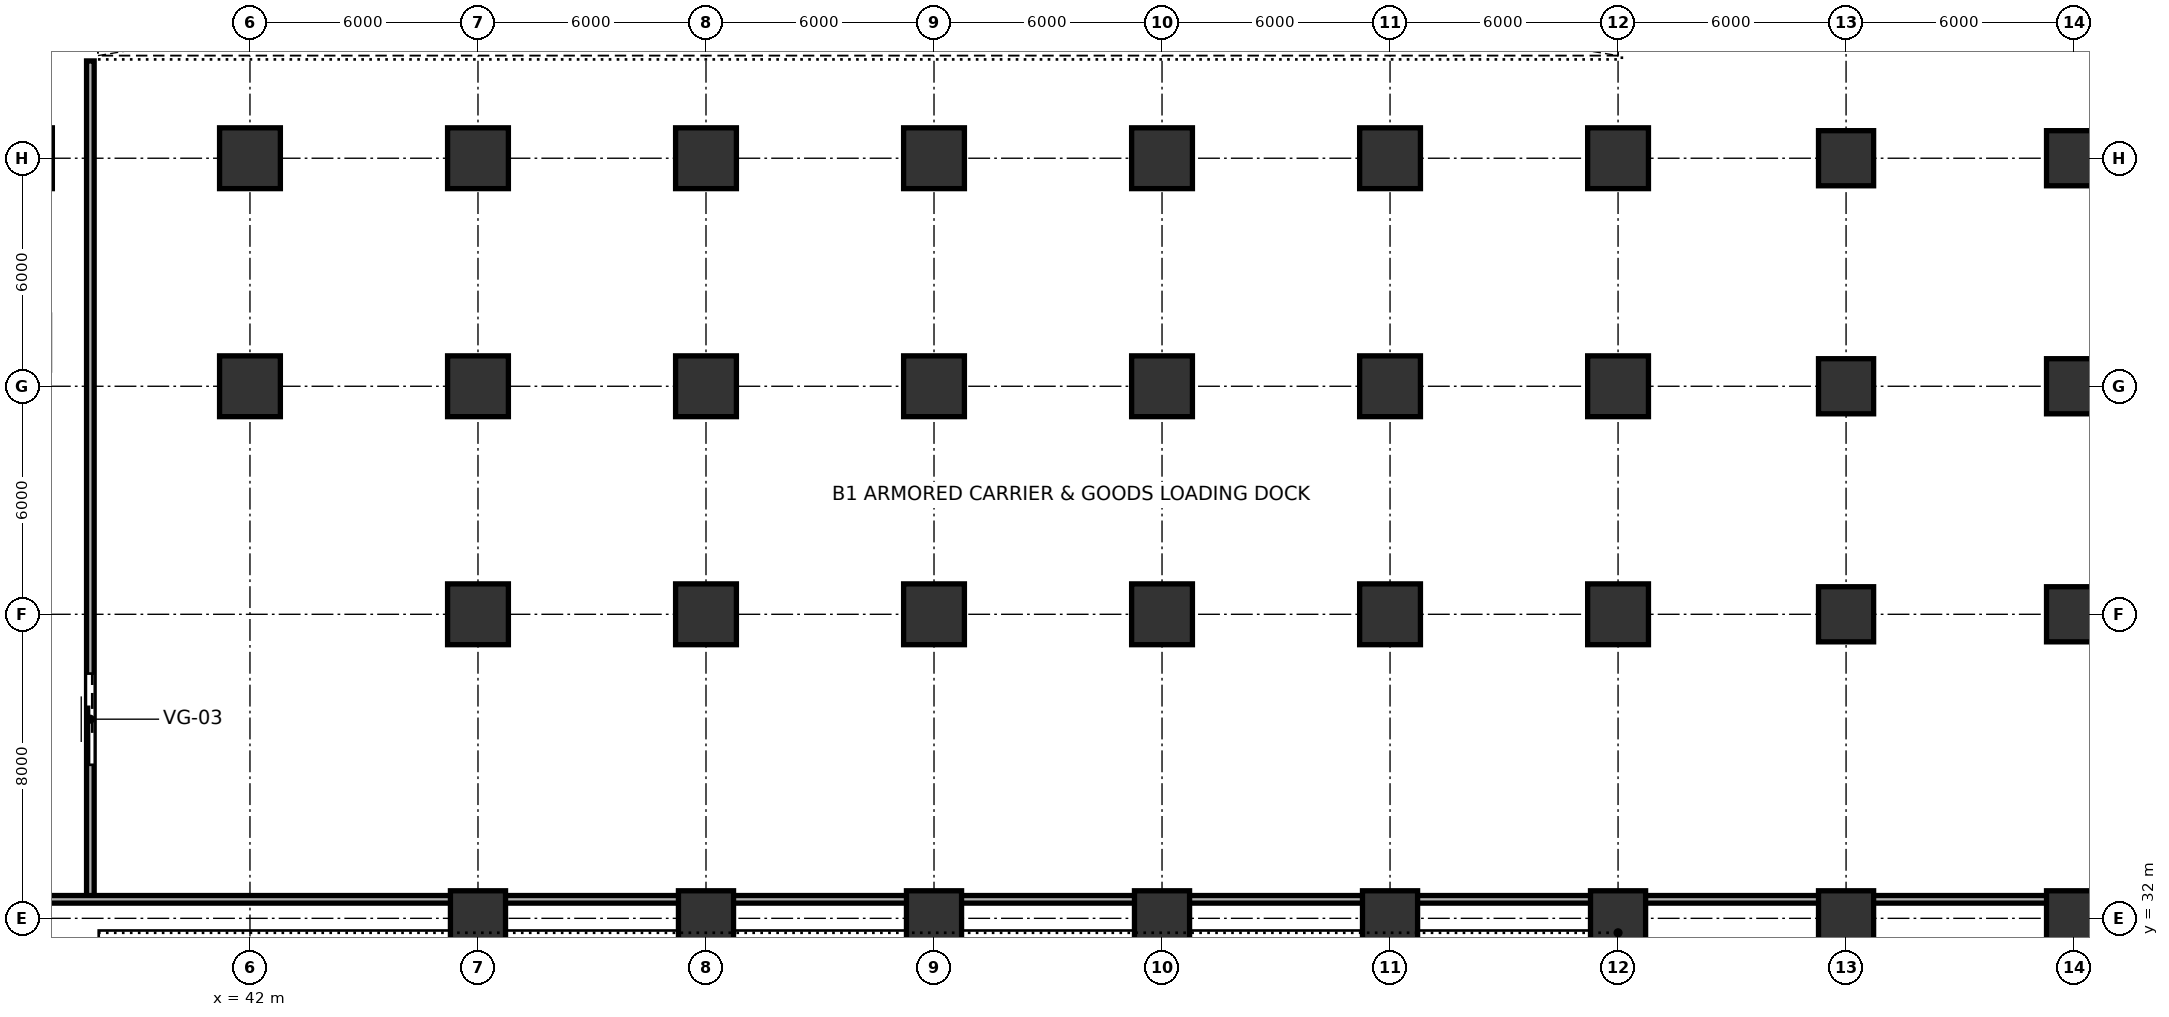
"""IFC4 building model, lengths in metres.
Left out: names, types, materials, properties, quantities, classifications, styles, units other than length and angle.
Written with IfcOpenShell. Run it as: python <this file> out.ifc"""

import sys

from ifc_helpers import new_model, si_unit, direction, frame, frame_2d, origin, origin_2d, place, context, subcontext, project, spatial, rectangle, extrude, source, transform, mapped, element, fill, save


model = new_model("IFC4")
c1 = context("Model", 3, precision=1e-05, world=origin(), true_north=direction((0.0, 1.0)))
c2 = subcontext(c1, "Body", "Model", "MODEL_VIEW")
j1 = project(units=[si_unit("LENGTHUNIT", "METRE"), si_unit("PLANEANGLEUNIT", "RADIAN")], contexts=[c1])
p1 = place(None, origin())
s1 = spatial("IfcSite", under=j1, at=p1, CompositionType="ELEMENT")
p2 = place(p1, origin())
s2 = spatial("IfcBuilding", under=s1, at=p2, CompositionType="ELEMENT")
p3 = place(p2, frame((0.0, 0.0, -4.8)))
s3 = spatial("IfcBuildingStorey", under=s2, at=p3, CompositionType="ELEMENT", Elevation=-4.8)
m1 = source(origin(), c2, "Body", "SweptSolid", [
    extrude(rectangle(XDim=1.6, YDim=1.6, at=origin_2d()), origin(), (0.0, 0.0, 1.0), 4.799),
])
for number, where, z_axis, x_axis in (
    (1, (42.0, 46.0, 0.001), (0.0, 0.0, 1.0), (1.0, 0.0, 0.0)),
    (2, (42.0, 52.0, 0.001), (0.0, 0.0, 1.0), (1.0, 0.0, 0.0)),
):
    element("IfcColumn", number, at=place(p3, frame(where, z_axis=z_axis, x_axis=x_axis)), inside=s3, PredefinedType="COLUMN", context=c2, shape_type="MappedRepresentation", body=[
        mapped(m1, transform((0.0, 0.0, 0.0), scale=1.0)),
    ])
m2 = source(origin(), c2, "Body", "SweptSolid", [
    extrude(rectangle(XDim=1.45, YDim=1.45, at=origin_2d()), origin(), (0.0, 0.0, 1.0), 4.799),
])
p4 = place(p3, frame((48.0, 32.0, 0.001), z_axis=(0.0, 0.0, 1.0), x_axis=(1.0, 0.0, 0.0)))
e3 = element("IfcColumn", 3, at=p4, inside=s3, PredefinedType="COLUMN", context=c2, shape_type="MappedRepresentation", body=[
    mapped(m2, transform((0.0, 0.0, 0.0), scale=1.0)),
])
for number, where, z_axis, x_axis in (
    (4, (48.0, 40.0, 0.001), (0.0, 0.0, 1.0), (1.0, 0.0, 0.0)),
    (5, (48.0, 46.0, 0.001), (0.0, 0.0, 1.0), (1.0, 0.0, 0.0)),
    (6, (48.0, 52.0, 0.001), (0.0, 0.0, 1.0), (1.0, 0.0, 0.0)),
):
    element("IfcColumn", number, at=place(p3, frame(where, z_axis=z_axis, x_axis=x_axis)), inside=s3, PredefinedType="COLUMN", context=c2, shape_type="MappedRepresentation", body=[
        mapped(m1, transform((0.0, 0.0, 0.0), scale=1.0)),
    ])
p5 = place(p3, frame((54.0, 32.0, 0.001), z_axis=(0.0, 0.0, 1.0), x_axis=(1.0, 0.0, 0.0)))
e7 = element("IfcColumn", 7, at=p5, inside=s3, PredefinedType="COLUMN", context=c2, shape_type="MappedRepresentation", body=[
    mapped(m2, transform((0.0, 0.0, 0.0), scale=1.0)),
])
for number, where, z_axis, x_axis in (
    (8, (54.0, 40.0, 0.001), (0.0, 0.0, 1.0), (1.0, 0.0, 0.0)),
    (9, (54.0, 46.0, 0.001), (0.0, 0.0, 1.0), (1.0, 0.0, 0.0)),
    (10, (54.0, 52.0, 0.001), (0.0, 0.0, 1.0), (1.0, 0.0, 0.0)),
):
    element("IfcColumn", number, at=place(p3, frame(where, z_axis=z_axis, x_axis=x_axis)), inside=s3, PredefinedType="COLUMN", context=c2, shape_type="MappedRepresentation", body=[
        mapped(m1, transform((0.0, 0.0, 0.0), scale=1.0)),
    ])
p6 = place(p3, frame((60.0, 32.0, 0.001), z_axis=(0.0, 0.0, 1.0), x_axis=(1.0, 0.0, 0.0)))
e11 = element("IfcColumn", 11, at=p6, inside=s3, PredefinedType="COLUMN", context=c2, shape_type="MappedRepresentation", body=[
    mapped(m2, transform((0.0, 0.0, 0.0), scale=1.0)),
])
for number, where, z_axis, x_axis in (
    (12, (60.0, 40.0, 0.001), (0.0, 0.0, 1.0), (1.0, 0.0, 0.0)),
    (13, (60.0, 46.0, 0.001), (0.0, 0.0, 1.0), (1.0, 0.0, 0.0)),
    (14, (60.0, 52.0, 0.001), (0.0, 0.0, 1.0), (1.0, 0.0, 0.0)),
):
    element("IfcColumn", number, at=place(p3, frame(where, z_axis=z_axis, x_axis=x_axis)), inside=s3, PredefinedType="COLUMN", context=c2, shape_type="MappedRepresentation", body=[
        mapped(m1, transform((0.0, 0.0, 0.0), scale=1.0)),
    ])
p7 = place(p3, frame((66.0, 32.0, 0.001), z_axis=(0.0, 0.0, 1.0), x_axis=(1.0, 0.0, 0.0)))
e15 = element("IfcColumn", 15, at=p7, inside=s3, PredefinedType="COLUMN", context=c2, shape_type="MappedRepresentation", body=[
    mapped(m2, transform((0.0, 0.0, 0.0), scale=1.0)),
])
for number, where, z_axis, x_axis in (
    (16, (66.0, 40.0, 0.001), (0.0, 0.0, 1.0), (1.0, 0.0, 0.0)),
    (17, (66.0, 46.0, 0.001), (0.0, 0.0, 1.0), (1.0, 0.0, 0.0)),
    (18, (66.0, 52.0, 0.001), (0.0, 0.0, 1.0), (1.0, 0.0, 0.0)),
):
    element("IfcColumn", number, at=place(p3, frame(where, z_axis=z_axis, x_axis=x_axis)), inside=s3, PredefinedType="COLUMN", context=c2, shape_type="MappedRepresentation", body=[
        mapped(m1, transform((0.0, 0.0, 0.0), scale=1.0)),
    ])
p8 = place(p3, frame((72.0, 32.0, 0.001), z_axis=(0.0, 0.0, 1.0), x_axis=(1.0, 0.0, 0.0)))
e19 = element("IfcColumn", 19, at=p8, inside=s3, PredefinedType="COLUMN", context=c2, shape_type="MappedRepresentation", body=[
    mapped(m2, transform((0.0, 0.0, 0.0), scale=1.0)),
])
for number, where, z_axis, x_axis in (
    (20, (72.0, 40.0, 0.001), (0.0, 0.0, 1.0), (1.0, 0.0, 0.0)),
    (21, (72.0, 46.0, 0.001), (0.0, 0.0, 1.0), (1.0, 0.0, 0.0)),
    (22, (72.0, 52.0, 0.001), (0.0, 0.0, 1.0), (1.0, 0.0, 0.0)),
):
    element("IfcColumn", number, at=place(p3, frame(where, z_axis=z_axis, x_axis=x_axis)), inside=s3, PredefinedType="COLUMN", context=c2, shape_type="MappedRepresentation", body=[
        mapped(m1, transform((0.0, 0.0, 0.0), scale=1.0)),
    ])
p9 = place(p3, frame((78.0, 32.0, 0.001), z_axis=(0.0, 0.0, 1.0), x_axis=(1.0, 0.0, 0.0)))
e23 = element("IfcColumn", 23, at=p9, inside=s3, PredefinedType="COLUMN", context=c2, shape_type="MappedRepresentation", body=[
    mapped(m2, transform((0.0, 0.0, 0.0), scale=1.0)),
])
for number, where, z_axis, x_axis in (
    (24, (78.0, 40.0, 0.001), (0.0, 0.0, 1.0), (1.0, 0.0, 0.0)),
    (25, (78.0, 46.0, 0.001), (0.0, 0.0, 1.0), (1.0, 0.0, 0.0)),
    (26, (78.0, 52.0, 0.001), (0.0, 0.0, 1.0), (1.0, 0.0, 0.0)),
):
    element("IfcColumn", number, at=place(p3, frame(where, z_axis=z_axis, x_axis=x_axis)), inside=s3, PredefinedType="COLUMN", context=c2, shape_type="MappedRepresentation", body=[
        mapped(m1, transform((0.0, 0.0, 0.0), scale=1.0)),
    ])
m3 = source(origin(), c2, "Body", "SweptSolid", [
    extrude(rectangle(XDim=1.45, YDim=1.45, at=origin_2d()), origin(), (0.0, 0.0, 1.0), 4.599),
])
for number, where, z_axis, x_axis in (
    (27, (84.0, 32.0, 0.001), (0.0, 0.0, 1.0), (1.0, 0.0, 0.0)),
    (28, (84.0, 40.0, 0.001), (0.0, 0.0, 1.0), (1.0, 0.0, 0.0)),
    (29, (84.0, 46.0, 0.001), (0.0, 0.0, 1.0), (1.0, 0.0, 0.0)),
    (30, (84.0, 52.0, 0.001), (0.0, 0.0, 1.0), (1.0, 0.0, 0.0)),
):
    element("IfcColumn", number, at=place(p3, frame(where, z_axis=z_axis, x_axis=x_axis)), inside=s3, PredefinedType="COLUMN", context=c2, shape_type="MappedRepresentation", body=[
        mapped(m3, transform((0.0, 0.0, 0.0), scale=1.0)),
    ])
m4 = source(origin(), c2, "Body", "SweptSolid", [
    extrude(rectangle(XDim=1.45, YDim=1.45, at=origin_2d()), origin(), (0.0, 0.0, 1.0), 4.599),
])
for number, where, z_axis, x_axis in (
    (31, (90.0, 32.0, 0.001), (0.0, 0.0, 1.0), (1.0, 0.0, 0.0)),
    (32, (90.0, 40.0, 0.001), (0.0, 0.0, 1.0), (1.0, 0.0, 0.0)),
    (33, (90.0, 46.0, 0.001), (0.0, 0.0, 1.0), (1.0, 0.0, 0.0)),
    (34, (90.0, 52.0, 0.001), (0.0, 0.0, 1.0), (1.0, 0.0, 0.0)),
):
    element("IfcColumn", number, at=place(p3, frame(where, z_axis=z_axis, x_axis=x_axis)), inside=s3, PredefinedType="COLUMN", context=c2, shape_type="MappedRepresentation", body=[
        mapped(m4, transform((0.0, 0.0, 0.0), scale=1.0)),
    ])
p10 = place(p3, frame((37.8, 32.54, 0.0), z_axis=(0.0, 0.0, 1.0), x_axis=(0.0, 1.0, 0.0)))
e35 = element("IfcWall", 35, at=p10, inside=s3, PredefinedType="SOLIDWALL", context=c2, shape_type="SweptSolid", body=[
    extrude(rectangle(XDim=22.02, YDim=0.2, at=frame_2d((11.01, 0.0))), origin(), (0.0, 0.0, 1.0), 3.883),
])
p11 = place(p10, frame((3.5, 0.0, 0.0)))
e36 = element("IfcOpeningElement", 36, at=p11, cuts=e35, PredefinedType="OPENING", context=c2, shape_type="SweptSolid", body=[
    extrude(rectangle(XDim=2.4, YDim=2.4, at=frame_2d((1.2, 1.2))), frame((0.0, 0.11, 0.0), z_axis=(0.0, -1.0, 0.0), x_axis=(1.0, 0.0, 0.0)), (0.0, 0.0, 1.0), 0.22),
])
p12 = place(p3, frame((27.24, 32.5, 0.0), z_axis=(0.0, 0.0, 1.0), x_axis=(1.0, 0.0, 0.0)))
e37 = element("IfcWall", 37, at=p12, inside=s3, PredefinedType="SOLIDWALL", context=c2, shape_type="SweptSolid", body=[
    extrude(rectangle(XDim=62.22, YDim=0.2, at=frame_2d((31.11, 0.0))), origin(), (0.0, 0.0, 1.0), 3.655),
])
m5 = source(origin(), c2, "Body", "SweptSolid", [
    extrude(rectangle(XDim=2.4, YDim=2.4, at=frame_2d((1.2, 1.2))), frame((0.0, 0.025, 0.0), z_axis=(0.0, -1.0, 0.0), x_axis=(1.0, 0.0, 0.0)), (0.0, 0.0, 1.0), 0.05),
])
p13 = place(p11, origin())
e38 = element("IfcDoor", 38, at=p13, inside=s3, OperationType="SLIDING_TO_LEFT", PredefinedType="GATE", context=c2, shape_type="MappedRepresentation", body=[
    mapped(m5, transform((0.0, 0.0, 0.0), scale=1.0)),
])
fill(e36, e38)
save(model, sys.argv[1])
